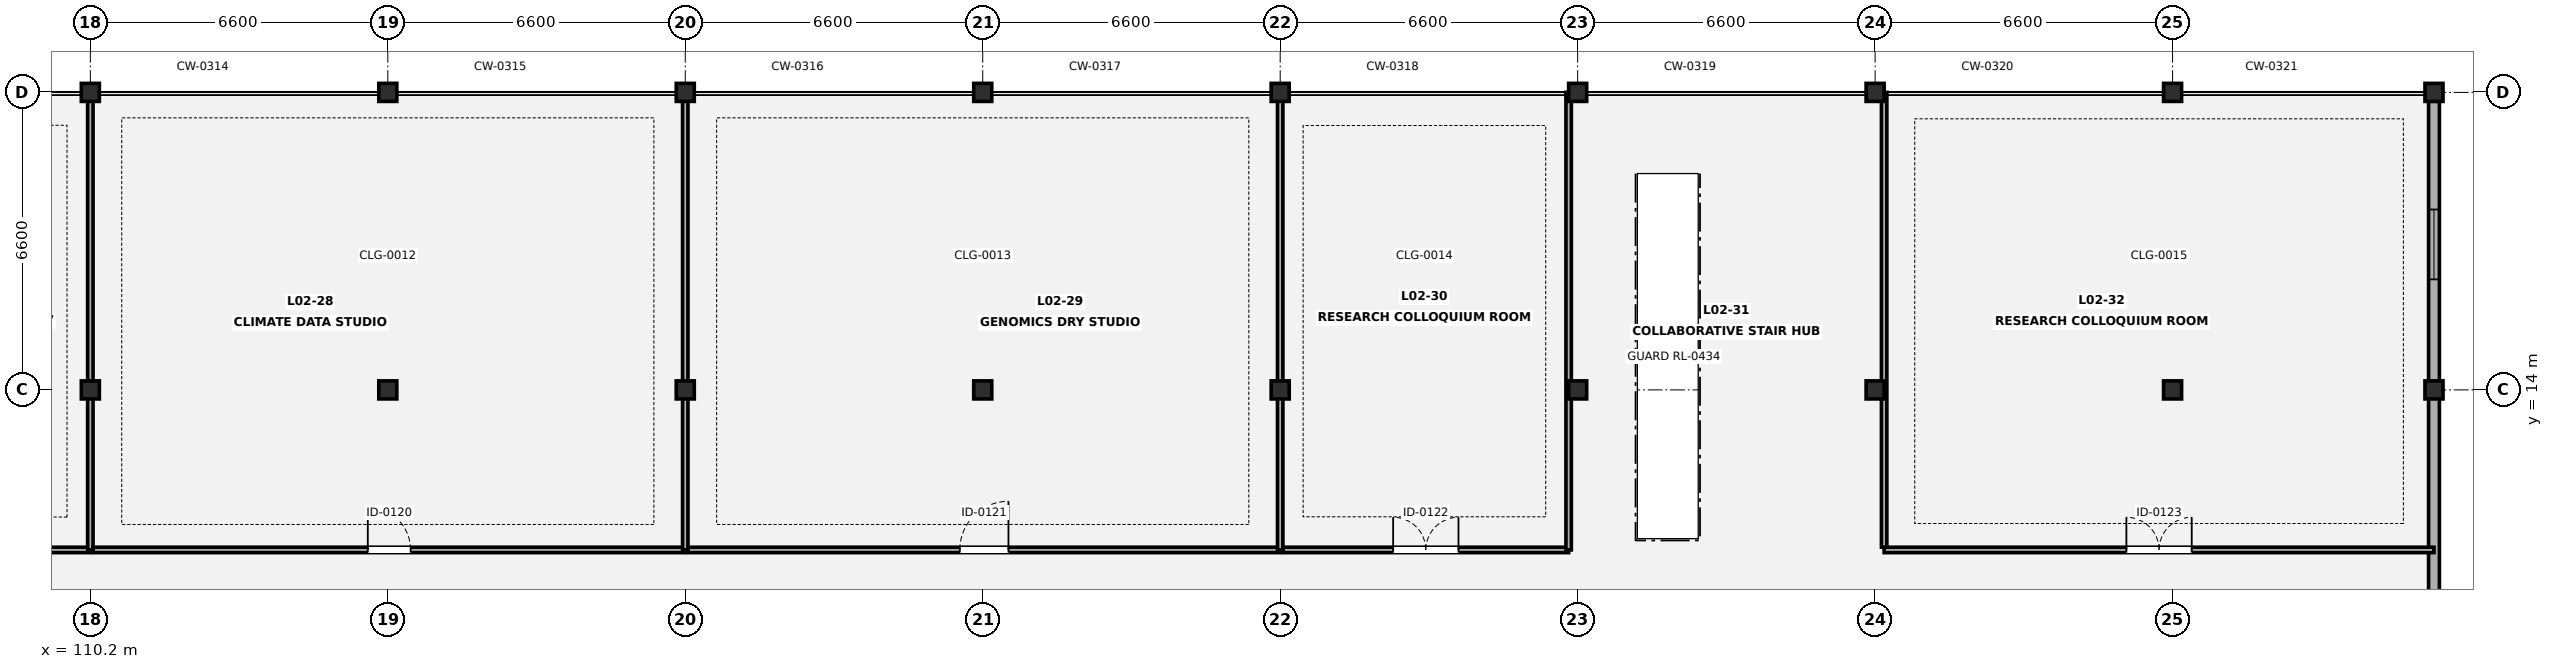
"""IFC4 building model, lengths in metres.
Left out: names, types, materials, properties, quantities, classifications, styles, units other than length and angle.
Written with IfcOpenShell. Run it as: python <this file> out.ifc"""

import sys

from ifc_helpers import new_model, si_unit, direction, frame, frame_2d, origin, origin_2d, place, context, subcontext, project, spatial, rectangle, i_section, extrude, element, fill, save


model = new_model("IFC4")
c1 = context("Model", 3, precision=1e-05, world=origin(), true_north=direction((0.0, 1.0)))
c2 = subcontext(c1, "Body", "Model", "MODEL_VIEW")
j1 = project(units=[si_unit("LENGTHUNIT", "METRE"), si_unit("PLANEANGLEUNIT", "RADIAN")], contexts=[c1])
p1 = place(None, origin())
s1 = spatial("IfcSite", under=j1, at=p1, CompositionType="ELEMENT")
p2 = place(p1, origin())
s2 = spatial("IfcBuilding", under=s1, at=p2, CompositionType="ELEMENT")
p3 = place(p2, frame((0.0, 0.0, 9.1)))
s3 = spatial("IfcBuildingStorey", under=s2, at=p3, CompositionType="ELEMENT", Elevation=9.1)
for number, where, z_axis, x_axis in (
    (1, (110.2, 14.0, 0.0), (0.0, 0.0, 1.0), (1.0, 0.0, 0.0)),
    (2, (110.2, 20.6, 0.0), (0.0, 0.0, 1.0), (1.0, 0.0, 0.0)),
    (3, (116.8, 14.0, 0.0), (0.0, 0.0, 1.0), (1.0, 0.0, 0.0)),
    (4, (116.8, 20.6, 0.0), (0.0, 0.0, 1.0), (1.0, 0.0, 0.0)),
    (5, (123.4, 14.0, 0.0), (0.0, 0.0, 1.0), (1.0, 0.0, 0.0)),
    (6, (123.4, 20.6, 0.0), (0.0, 0.0, 1.0), (1.0, 0.0, 0.0)),
    (7, (130.0, 14.0, 0.0), (0.0, 0.0, 1.0), (1.0, 0.0, 0.0)),
    (8, (130.0, 20.6, 0.0), (0.0, 0.0, 1.0), (1.0, 0.0, 0.0)),
    (9, (136.6, 14.0, 0.0), (0.0, 0.0, 1.0), (1.0, 0.0, 0.0)),
    (10, (136.6, 20.6, 0.0), (0.0, 0.0, 1.0), (1.0, 0.0, 0.0)),
    (11, (143.2, 14.0, 0.0), (0.0, 0.0, 1.0), (1.0, 0.0, 0.0)),
    (12, (143.2, 20.6, 0.0), (0.0, 0.0, 1.0), (1.0, 0.0, 0.0)),
    (13, (149.8, 14.0, 0.0), (0.0, 0.0, 1.0), (1.0, 0.0, 0.0)),
    (14, (149.8, 20.6, 0.0), (0.0, 0.0, 1.0), (1.0, 0.0, 0.0)),
    (15, (156.4, 14.0, 0.0), (0.0, 0.0, 1.0), (1.0, 0.0, 0.0)),
    (16, (156.4, 20.6, 0.0), (0.0, 0.0, 1.0), (1.0, 0.0, 0.0)),
    (17, (162.2, 14.0, 0.0), (0.0, 0.0, 1.0), (1.0, 0.0, 0.0)),
    (18, (162.2, 20.6, 0.0), (0.0, 0.0, 1.0), (1.0, 0.0, 0.0)),
):
    element("IfcColumn", number, at=place(p3, frame(where, z_axis=z_axis, x_axis=x_axis)), inside=s3, PredefinedType="COLUMN", context=c2, shape_type="SweptSolid", body=[
        extrude(i_section(OverallWidth=0.4, OverallDepth=0.4, WebThickness=0.02, FlangeThickness=0.035, FilletRadius=0.016, at=origin_2d()), origin(), (0.0, 0.0, 1.0), 4.2),
    ])
p4 = place(p3, frame((162.2, 20.402, 0.0), z_axis=(0.0, 0.0, 1.0), x_axis=(0.0, -1.0, 0.0)))
e19 = element("IfcWall", 19, at=p4, inside=s3, PredefinedType="SOLIDWALL", context=c2, shape_type="SweptSolid", body=[
    extrude(rectangle(XDim=19.404, YDim=0.24, at=frame_2d((9.702, 0.0))), origin(), (0.0, 0.0, 1.0), 3.372),
])
p5 = place(p4, frame((2.4, 0.0, 0.85)))
e20 = element("IfcOpeningElement", 20, at=p5, cuts=e19, PredefinedType="OPENING", context=c2, shape_type="SweptSolid", body=[
    extrude(rectangle(XDim=1.55, YDim=1.4, at=frame_2d((0.775, 0.7))), frame((0.0, 0.13, 0.0), z_axis=(0.0, -1.0, 0.0), x_axis=(1.0, 0.0, 0.0)), (0.0, 0.0, 1.0), 0.26),
])
p6 = place(p4, frame((15.1, 0.0, 0.85)))
e21 = element("IfcOpeningElement", 21, at=p6, cuts=e19, PredefinedType="OPENING", context=c2, shape_type="SweptSolid", body=[
    extrude(rectangle(XDim=1.95, YDim=1.5, at=frame_2d((0.975, 0.75))), frame((0.0, 0.13, 0.0), z_axis=(0.0, -1.0, 0.0), x_axis=(1.0, 0.0, 0.0)), (0.0, 0.0, 1.0), 0.26),
])
p7 = place(p3, frame((103.6, 10.45, 0.0), z_axis=(0.0, 0.0, 1.0), x_axis=(1.0, 0.0, 0.0)))
e22 = element("IfcWall", 22, at=p7, inside=s3, PredefinedType="PARTITIONING", context=c2, shape_type="SweptSolid", body=[
    extrude(rectangle(XDim=6.6, YDim=0.12, at=frame_2d((3.3, 0.0))), origin(), (0.0, 0.0, 1.0), 3.546),
])
p8 = place(p7, frame((2.76, 0.0, 0.0)))
e23 = element("IfcOpeningElement", 23, at=p8, cuts=e22, PredefinedType="OPENING", context=c2, shape_type="SweptSolid", body=[
    extrude(rectangle(XDim=1.08, YDim=2.12, at=frame_2d((0.54, 1.06))), frame((0.0, 0.07, 0.0), z_axis=(0.0, -1.0, 0.0), x_axis=(1.0, 0.0, 0.0)), (0.0, 0.0, 1.0), 0.14),
])
p9 = place(p3, frame((110.2, 10.45, 0.0), z_axis=(0.0, 0.0, 1.0), x_axis=(0.0, 1.0, 0.0)))
e24 = element("IfcWall", 24, at=p9, inside=s3, PredefinedType="PARTITIONING", context=c2, shape_type="SweptSolid", body=[
    extrude(rectangle(XDim=10.15, YDim=0.12, at=frame_2d((5.075, 0.0))), origin(), (0.0, 0.0, 1.0), 3.372),
])
p10 = place(p3, frame((110.262, 10.45, 0.0), z_axis=(0.0, 0.0, 1.0), x_axis=(1.0, 0.0, 0.0)))
e25 = element("IfcWall", 25, at=p10, inside=s3, PredefinedType="PARTITIONING", context=c2, shape_type="SweptSolid", body=[
    extrude(rectangle(XDim=13.138, YDim=0.12, at=frame_2d((6.569, 0.0))), origin(), (0.0, 0.0, 1.0), 3.546),
])
p11 = place(p10, frame((6.094, 0.0, 0.0)))
e26 = element("IfcOpeningElement", 26, at=p11, cuts=e25, PredefinedType="OPENING", context=c2, shape_type="SweptSolid", body=[
    extrude(rectangle(XDim=0.95, YDim=2.1, at=frame_2d((0.475, 1.05))), frame((0.0, 0.07, 0.0), z_axis=(0.0, -1.0, 0.0), x_axis=(1.0, 0.0, 0.0)), (0.0, 0.0, 1.0), 0.14),
])
p12 = place(p3, frame((123.4, 10.45, 0.0), z_axis=(0.0, 0.0, 1.0), x_axis=(0.0, 1.0, 0.0)))
e27 = element("IfcWall", 27, at=p12, inside=s3, PredefinedType="PARTITIONING", context=c2, shape_type="SweptSolid", body=[
    extrude(rectangle(XDim=10.15, YDim=0.12, at=frame_2d((5.075, 0.0))), origin(), (0.0, 0.0, 1.0), 3.372),
])
p13 = place(p3, frame((123.462, 10.45, 0.0), z_axis=(0.0, 0.0, 1.0), x_axis=(1.0, 0.0, 0.0)))
e28 = element("IfcWall", 28, at=p13, inside=s3, PredefinedType="PARTITIONING", context=c2, shape_type="SweptSolid", body=[
    extrude(rectangle(XDim=13.138, YDim=0.12, at=frame_2d((6.569, 0.0))), origin(), (0.0, 0.0, 1.0), 3.546),
])
p14 = place(p13, frame((6.029, 0.0, 0.0)))
e29 = element("IfcOpeningElement", 29, at=p14, cuts=e28, PredefinedType="OPENING", context=c2, shape_type="SweptSolid", body=[
    extrude(rectangle(XDim=1.08, YDim=2.12, at=frame_2d((0.54, 1.06))), frame((0.0, 0.07, 0.0), z_axis=(0.0, -1.0, 0.0), x_axis=(1.0, 0.0, 0.0)), (0.0, 0.0, 1.0), 0.14),
])
p15 = place(p3, frame((136.6, 10.45, 0.0), z_axis=(0.0, 0.0, 1.0), x_axis=(0.0, 1.0, 0.0)))
e30 = element("IfcWall", 30, at=p15, inside=s3, PredefinedType="PARTITIONING", context=c2, shape_type="SweptSolid", body=[
    extrude(rectangle(XDim=10.15, YDim=0.12, at=frame_2d((5.075, 0.0))), origin(), (0.0, 0.0, 1.0), 3.372),
])
p16 = place(p3, frame((136.662, 10.45, 0.0), z_axis=(0.0, 0.0, 1.0), x_axis=(1.0, 0.0, 0.0)))
e31 = element("IfcWall", 31, at=p16, inside=s3, PredefinedType="PARTITIONING", context=c2, shape_type="SweptSolid", body=[
    extrude(rectangle(XDim=6.338, YDim=0.12, at=frame_2d((3.169, 0.0))), origin(), (0.0, 0.0, 1.0), 3.546),
])
p17 = place(p16, frame((2.444, 0.0, 0.0)))
e32 = element("IfcOpeningElement", 32, at=p17, cuts=e31, PredefinedType="OPENING", context=c2, shape_type="SweptSolid", body=[
    extrude(rectangle(XDim=1.45, YDim=2.12, at=frame_2d((0.725, 1.06))), frame((0.0, 0.07, 0.0), z_axis=(0.0, -1.0, 0.0), x_axis=(1.0, 0.0, 0.0)), (0.0, 0.0, 1.0), 0.14),
])
p18 = place(p3, frame((143.0, 10.45, 0.0), z_axis=(0.0, 0.0, 1.0), x_axis=(0.0, 1.0, 0.0)))
e33 = element("IfcWall", 33, at=p18, inside=s3, PredefinedType="PARTITIONING", context=c2, shape_type="SweptSolid", body=[
    extrude(rectangle(XDim=10.15, YDim=0.12, at=frame_2d((5.075, 0.0))), origin(), (0.0, 0.0, 1.0), 3.372),
])
p19 = place(p3, frame((150.0, 10.45, 0.0), z_axis=(0.0, 0.0, 1.0), x_axis=(1.0, 0.0, 0.0)))
e34 = element("IfcWall", 34, at=p19, inside=s3, PredefinedType="PARTITIONING", context=c2, shape_type="SweptSolid", body=[
    extrude(rectangle(XDim=12.2, YDim=0.12, at=frame_2d((6.1, 0.0))), origin(), (0.0, 0.0, 1.0), 3.546),
])
p20 = place(p19, frame((5.375, 0.0, 0.0)))
e35 = element("IfcOpeningElement", 35, at=p20, cuts=e34, PredefinedType="OPENING", context=c2, shape_type="SweptSolid", body=[
    extrude(rectangle(XDim=1.45, YDim=2.12, at=frame_2d((0.725, 1.06))), frame((0.0, 0.07, 0.0), z_axis=(0.0, -1.0, 0.0), x_axis=(1.0, 0.0, 0.0)), (0.0, 0.0, 1.0), 0.14),
])
p21 = place(p3, frame((150.0, 10.512, 0.0), z_axis=(0.0, 0.0, 1.0), x_axis=(0.0, 1.0, 0.0)))
e36 = element("IfcWall", 36, at=p21, inside=s3, PredefinedType="PARTITIONING", context=c2, shape_type="SweptSolid", body=[
    extrude(rectangle(XDim=10.088, YDim=0.12, at=frame_2d((5.044, 0.0))), origin(), (0.0, 0.0, 1.0), 3.372),
])
p22 = place(p5, origin())
e37 = element("IfcWindow", 37, at=p22, inside=s3, PartitioningType="SINGLE_PANEL", PredefinedType="WINDOW", context=c2, shape_type="SweptSolid", body=[
    extrude(rectangle(XDim=1.55, YDim=1.4, at=frame_2d((0.775, 0.7))), frame((0.0, 0.03, 0.0), z_axis=(0.0, -1.0, 0.0), x_axis=(1.0, 0.0, 0.0)), (0.0, 0.0, 1.0), 0.06),
])
fill(e20, e37)
p23 = place(p11, origin())
e38 = element("IfcDoor", 38, at=p23, inside=s3, OperationType="SINGLE_SWING_LEFT", PredefinedType="DOOR", context=c2, shape_type="SweptSolid", body=[
    extrude(rectangle(XDim=0.95, YDim=2.1, at=frame_2d((0.475, 1.05))), frame((0.0, 0.025, 0.0), z_axis=(0.0, -1.0, 0.0), x_axis=(1.0, 0.0, 0.0)), (0.0, 0.0, 1.0), 0.05),
])
fill(e26, e38)
p24 = place(p14, origin())
e39 = element("IfcDoor", 39, at=p24, inside=s3, OperationType="SINGLE_SWING_RIGHT", PredefinedType="DOOR", context=c2, shape_type="SweptSolid", body=[
    extrude(rectangle(XDim=1.08, YDim=2.12, at=frame_2d((0.54, 1.06))), frame((0.0, 0.025, 0.0), z_axis=(0.0, -1.0, 0.0), x_axis=(1.0, 0.0, 0.0)), (0.0, 0.0, 1.0), 0.05),
])
fill(e29, e39)
p25 = place(p17, origin())
e40 = element("IfcDoor", 40, at=p25, inside=s3, OperationType="DOUBLE_DOOR_SINGLE_SWING", PredefinedType="DOOR", context=c2, shape_type="SweptSolid", body=[
    extrude(rectangle(XDim=1.45, YDim=2.12, at=frame_2d((0.725, 1.06))), frame((0.0, 0.025, 0.0), z_axis=(0.0, -1.0, 0.0), x_axis=(1.0, 0.0, 0.0)), (0.0, 0.0, 1.0), 0.05),
])
fill(e32, e40)
p26 = place(p20, origin())
e41 = element("IfcDoor", 41, at=p26, inside=s3, OperationType="DOUBLE_DOOR_SINGLE_SWING", PredefinedType="DOOR", context=c2, shape_type="SweptSolid", body=[
    extrude(rectangle(XDim=1.45, YDim=2.12, at=frame_2d((0.725, 1.06))), frame((0.0, 0.025, 0.0), z_axis=(0.0, -1.0, 0.0), x_axis=(1.0, 0.0, 0.0)), (0.0, 0.0, 1.0), 0.05),
])
fill(e35, e41)
save(model, sys.argv[1])
